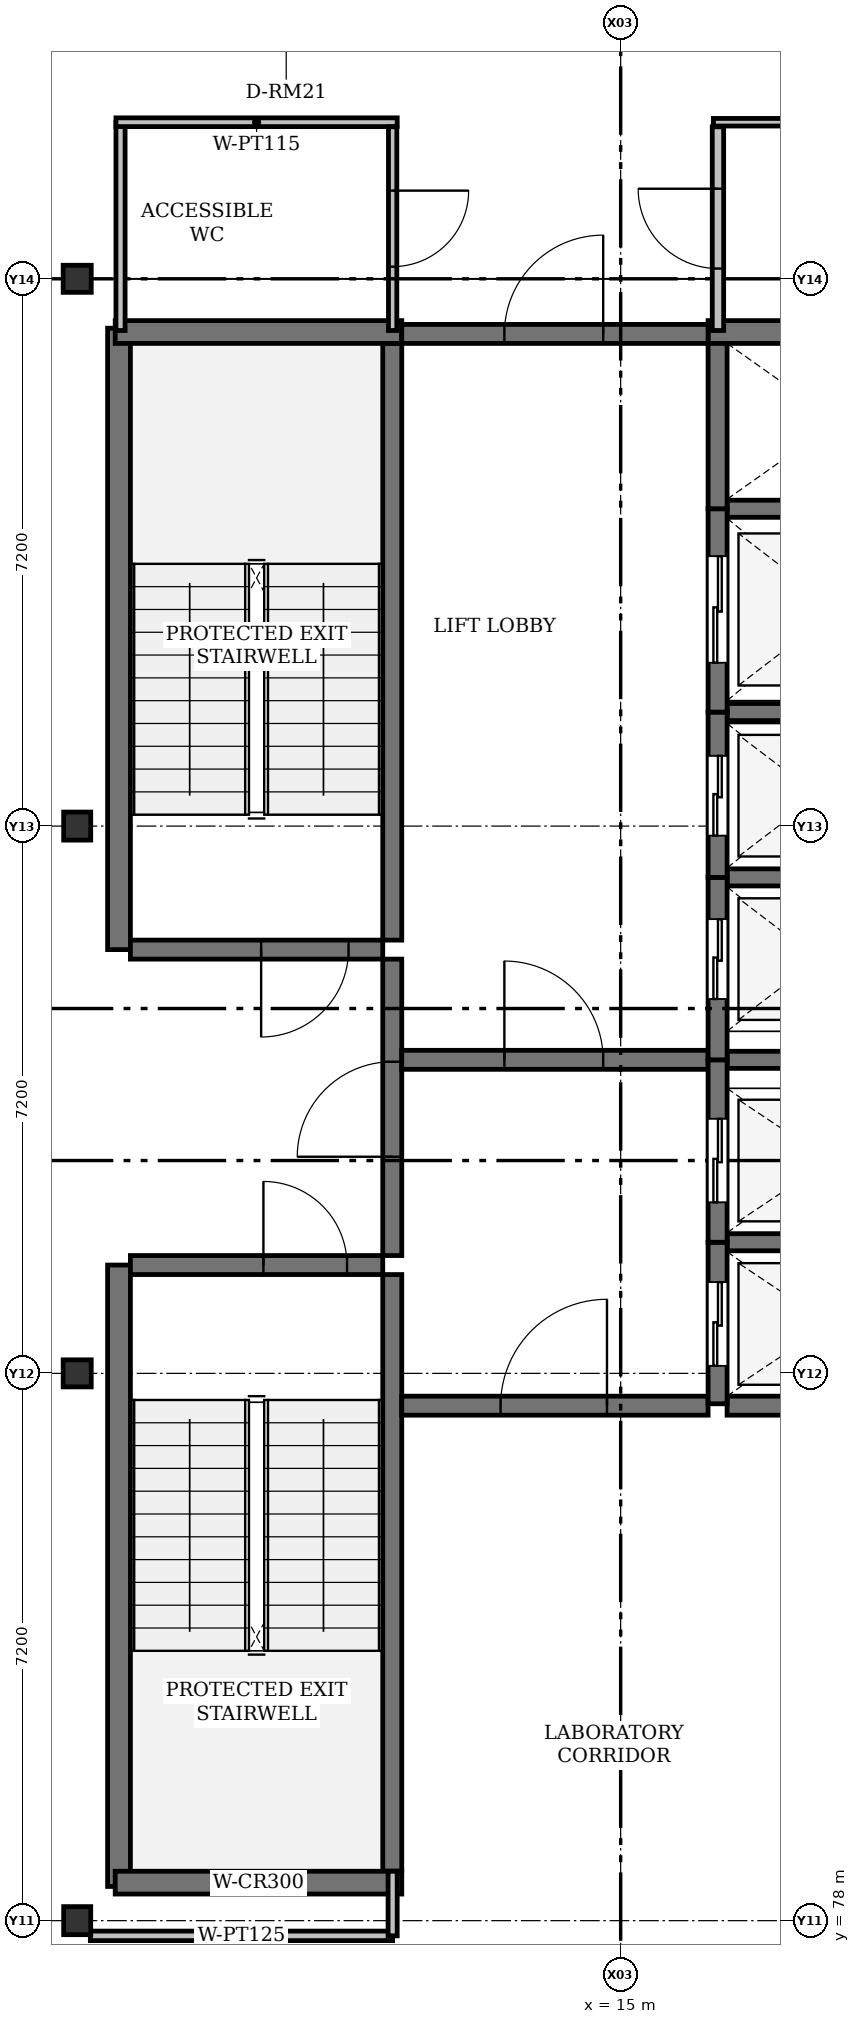
"""IFC4 building model, lengths in metres.
Left out: names, types, materials, properties, quantities, classifications, styles, units other than length and angle.
Written with IfcOpenShell. Run it as: python <this file> out.ifc"""

import sys

from ifc_helpers import new_model, si_unit, direction, frame, frame_2d, origin, origin_2d, place, context, subcontext, project, spatial, rectangle, i_section, extrude, element, fill, save


model = new_model("IFC4")
c1 = context("Model", 3, precision=1e-05, world=origin(), true_north=direction((0.0, 1.0)))
c2 = subcontext(c1, "Body", "Model", "MODEL_VIEW")
j1 = project(units=[si_unit("LENGTHUNIT", "METRE"), si_unit("PLANEANGLEUNIT", "RADIAN")], contexts=[c1])
p1 = place(None, origin())
s1 = spatial("IfcSite", under=j1, at=p1, CompositionType="ELEMENT")
p2 = place(p1, origin())
s2 = spatial("IfcBuilding", under=s1, at=p2, CompositionType="ELEMENT")
p3 = place(p2, frame((0.0, 0.0, 47.7)))
s3 = spatial("IfcBuildingStorey", under=s2, at=p3, CompositionType="ELEMENT", Elevation=47.7)
for number, where, z_axis, x_axis in (
    (1, (7.85, 78.0, 0.0), (0.0, 0.0, 1.0), (0.0, 1.0, 0.0)),
    (2, (7.85, 85.2, 0.0), (0.0, 0.0, 1.0), (1.0, 0.0, 0.0)),
    (3, (7.85, 92.4, 0.0), (0.0, 0.0, 1.0), (0.0, 1.0, 0.0)),
    (4, (7.85, 99.6, 0.0), (0.0, 0.0, 1.0), (1.0, 0.0, 0.0)),
):
    element("IfcColumn", number, at=place(p3, frame(where, z_axis=z_axis, x_axis=x_axis)), inside=s3, PredefinedType="COLUMN", context=c2, shape_type="SweptSolid", body=[
        extrude(i_section(OverallWidth=0.369, OverallDepth=0.356, WebThickness=0.011, FlangeThickness=0.018, FilletRadius=0.015, at=origin_2d()), origin(), (0.0, 0.0, 1.0), 4.2),
    ])
for number, where, z_axis, x_axis in (
    (5, (8.4, 78.45, 0.0), (0.0, 0.0, 1.0), (0.0, 1.0, 0.0)),
    (6, (8.4, 90.775, 0.0), (0.0, 0.0, 1.0), (0.0, 1.0, 0.0)),
):
    element("IfcWall", number, at=place(p3, frame(where, z_axis=z_axis, x_axis=x_axis)), inside=s3, PredefinedType="SHEAR", context=c2, shape_type="SweptSolid", body=[
        extrude(rectangle(XDim=8.175, YDim=0.3, at=frame_2d((4.087, 0.0))), origin(), (0.0, 0.0, 1.0), 4.2),
    ])
for number, where, z_axis, x_axis in (
    (7, (11.995, 78.65, 0.0), (0.0, 0.0, 1.0), (0.0, 1.0, 0.0)),
    (8, (11.995, 90.9, 0.0), (0.0, 0.0, 1.0), (0.0, 1.0, 0.0)),
):
    element("IfcWall", number, at=place(p3, frame(where, z_axis=z_axis, x_axis=x_axis)), inside=s3, PredefinedType="SHEAR", context=c2, shape_type="SweptSolid", body=[
        extrude(rectangle(XDim=7.85, YDim=0.25, at=frame_2d((3.925, 0.0))), origin(), (0.0, 0.0, 1.0), 4.2),
    ])
p4 = place(p3, frame((11.995, 86.75, 0.0), z_axis=(0.0, 0.0, 1.0), x_axis=(0.0, 1.0, 0.0)))
e9 = element("IfcWall", 9, at=p4, inside=s3, PredefinedType="SHEAR", context=c2, shape_type="SweptSolid", body=[
    extrude(rectangle(XDim=3.9, YDim=0.25, at=frame_2d((1.95, 0.0))), origin(), (0.0, 0.0, 1.0), 4.2),
])
p5 = place(p4, frame((1.3, 0.0, 0.0)))
e10 = element("IfcOpeningElement", 10, at=p5, cuts=e9, PredefinedType="OPENING", context=c2, shape_type="SweptSolid", body=[
    extrude(rectangle(XDim=1.25, YDim=2.2, at=frame_2d((0.625, 1.1))), frame((0.0, 0.125, 0.0), z_axis=(0.0, -1.0, 0.0), x_axis=(1.0, 0.0, 0.0)), (0.0, 0.0, 1.0), 0.25),
])
for number, where, z_axis, x_axis in (
    (11, (8.35, 78.5, 0.0), (0.0, 0.0, 1.0), (1.0, 0.0, 0.0)),
    (12, (8.35, 98.9, 0.0), (0.0, 0.0, 1.0), (1.0, 0.0, 0.0)),
):
    element("IfcWall", number, at=place(p3, frame(where, z_axis=z_axis, x_axis=x_axis)), inside=s3, PredefinedType="SHEAR", context=c2, shape_type="SweptSolid", body=[
        extrude(rectangle(XDim=3.77, YDim=0.3, at=frame_2d((1.885, 0.0))), origin(), (0.0, 0.0, 1.0), 4.2),
    ])
p6 = place(p3, frame((16.15, 98.9, 0.0), z_axis=(0.0, 0.0, 1.0), x_axis=(1.0, 0.0, 0.0)))
e13 = element("IfcWall", 13, at=p6, inside=s3, PredefinedType="SHEAR", context=c2, shape_type="SweptSolid", body=[
    extrude(rectangle(XDim=3.3, YDim=0.3, at=frame_2d((1.65, 0.0))), origin(), (0.0, 0.0, 1.0), 4.2),
])
p7 = place(p3, frame((12.12, 98.875, 0.0), z_axis=(0.0, 0.0, 1.0), x_axis=(1.0, 0.0, 0.0)))
e14 = element("IfcWall", 14, at=p7, inside=s3, PredefinedType="SHEAR", context=c2, shape_type="SweptSolid", body=[
    extrude(rectangle(XDim=4.03, YDim=0.25, at=frame_2d((2.015, 0.0))), origin(), (0.0, 0.0, 1.0), 4.2),
])
p8 = place(p7, frame((1.35, 0.0, 0.0)))
e15 = element("IfcOpeningElement", 15, at=p8, cuts=e14, PredefinedType="OPENING", context=c2, shape_type="SweptSolid", body=[
    extrude(rectangle(XDim=1.3, YDim=2.2, at=frame_2d((0.65, 1.1))), frame((0.0, 0.125, 0.0), z_axis=(0.0, -1.0, 0.0), x_axis=(1.0, 0.0, 0.0)), (0.0, 0.0, 1.0), 0.25),
])
p9 = place(p3, frame((8.55, 86.625, 0.0), z_axis=(0.0, 0.0, 1.0), x_axis=(1.0, 0.0, 0.0)))
e16 = element("IfcWall", 16, at=p9, inside=s3, PredefinedType="SHEAR", context=c2, shape_type="SweptSolid", body=[
    extrude(rectangle(XDim=3.32, YDim=0.25, at=frame_2d((1.66, 0.0))), origin(), (0.0, 0.0, 1.0), 4.2),
])
p10 = place(p9, frame((1.75, 0.0, 0.0)))
e17 = element("IfcOpeningElement", 17, at=p10, cuts=e16, PredefinedType="OPENING", context=c2, shape_type="SweptSolid", body=[
    extrude(rectangle(XDim=1.1, YDim=2.15, at=frame_2d((0.55, 1.075))), frame((0.0, 0.125, 0.0), z_axis=(0.0, -1.0, 0.0), x_axis=(1.0, 0.0, 0.0)), (0.0, 0.0, 1.0), 0.25),
])
p11 = place(p3, frame((11.87, 90.775, 0.0), z_axis=(0.0, 0.0, 1.0), x_axis=(-1.0, 0.0, 0.0)))
e18 = element("IfcWall", 18, at=p11, inside=s3, PredefinedType="SHEAR", context=c2, shape_type="SweptSolid", body=[
    extrude(rectangle(XDim=3.32, YDim=0.25, at=frame_2d((1.66, 0.0))), origin(), (0.0, 0.0, 1.0), 4.2),
])
p12 = place(p11, frame((0.45, 0.0, 0.0)))
e19 = element("IfcOpeningElement", 19, at=p12, cuts=e18, PredefinedType="OPENING", context=c2, shape_type="SweptSolid", body=[
    extrude(rectangle(XDim=1.15, YDim=2.15, at=frame_2d((0.575, 1.075))), frame((0.0, 0.125, 0.0), z_axis=(0.0, -1.0, 0.0), x_axis=(1.0, 0.0, 0.0)), (0.0, 0.0, 1.0), 0.25),
])
p13 = place(p3, frame((12.12, 89.325, 0.0), z_axis=(0.0, 0.0, 1.0), x_axis=(1.0, 0.0, 0.0)))
e20 = element("IfcWall", 20, at=p13, inside=s3, PredefinedType="SHEAR", context=c2, shape_type="SweptSolid", body=[
    extrude(rectangle(XDim=4.03, YDim=0.25, at=frame_2d((2.015, 0.0))), origin(), (0.0, 0.0, 1.0), 4.2),
])
p14 = place(p13, frame((1.35, 0.0, 0.0)))
e21 = element("IfcOpeningElement", 21, at=p14, cuts=e20, PredefinedType="OPENING", context=c2, shape_type="SweptSolid", body=[
    extrude(rectangle(XDim=1.3, YDim=2.2, at=frame_2d((0.65, 1.1))), frame((0.0, 0.125, 0.0), z_axis=(0.0, -1.0, 0.0), x_axis=(1.0, 0.0, 0.0)), (0.0, 0.0, 1.0), 0.25),
])
p15 = place(p3, frame((12.12, 84.775, 0.0), z_axis=(0.0, 0.0, 1.0), x_axis=(1.0, 0.0, 0.0)))
e22 = element("IfcWall", 22, at=p15, inside=s3, PredefinedType="SHEAR", context=c2, shape_type="SweptSolid", body=[
    extrude(rectangle(XDim=4.03, YDim=0.25, at=frame_2d((2.015, 0.0))), origin(), (0.0, 0.0, 1.0), 4.2),
])
p16 = place(p15, frame((1.3, 0.0, 0.0)))
e23 = element("IfcOpeningElement", 23, at=p16, cuts=e22, PredefinedType="OPENING", context=c2, shape_type="SweptSolid", body=[
    extrude(rectangle(XDim=1.4, YDim=2.25, at=frame_2d((0.7, 1.125))), frame((0.0, 0.125, 0.0), z_axis=(0.0, -1.0, 0.0), x_axis=(1.0, 0.0, 0.0)), (0.0, 0.0, 1.0), 0.25),
])
p17 = place(p3, frame((16.4, 84.775, 0.0), z_axis=(0.0, 0.0, 1.0), x_axis=(1.0, 0.0, 0.0)))
e24 = element("IfcWall", 24, at=p17, inside=s3, PredefinedType="SHEAR", context=c2, shape_type="SweptSolid", body=[
    extrude(rectangle(XDim=2.95, YDim=0.25, at=frame_2d((1.475, 0.0))), origin(), (0.0, 0.0, 1.0), 4.2),
])
for number, where, z_axis, x_axis in (
    (25, (16.4, 86.925, 0.0), (0.0, 0.0, 1.0), (1.0, 0.0, 0.0)),
    (26, (16.4, 89.325, 0.0), (0.0, 0.0, 1.0), (1.0, 0.0, 0.0)),
    (27, (16.4, 91.725, 0.0), (0.0, 0.0, 1.0), (1.0, 0.0, 0.0)),
    (28, (16.4, 93.9, 0.0), (0.0, 0.0, 1.0), (1.0, 0.0, 0.0)),
    (29, (16.4, 96.575, 0.0), (0.0, 0.0, 1.0), (1.0, 0.0, 0.0)),
):
    element("IfcWall", number, at=place(p3, frame(where, z_axis=z_axis, x_axis=x_axis)), inside=s3, PredefinedType="SHEAR", context=c2, shape_type="SweptSolid", body=[
        extrude(rectangle(XDim=2.8, YDim=0.225, at=frame_2d((1.4, 0.0))), origin(), (0.0, 0.0, 1.0), 4.2),
    ])
p18 = place(p3, frame((16.275, 84.8, 0.0), z_axis=(0.0, 0.0, 1.0), x_axis=(0.0, 1.0, 0.0)))
e30 = element("IfcWall", 30, at=p18, inside=s3, PredefinedType="SHEAR", context=c2, shape_type="SweptSolid", body=[
    extrude(rectangle(XDim=2.125, YDim=0.25, at=frame_2d((1.062, 0.0))), origin(), (0.0, 0.0, 1.0), 4.2),
])
p19 = place(p18, frame((0.5, 0.0, 0.0)))
e31 = element("IfcOpeningElement", 31, at=p19, cuts=e30, PredefinedType="OPENING", context=c2, shape_type="SweptSolid", body=[
    extrude(rectangle(XDim=1.1, YDim=2.15, at=frame_2d((0.55, 1.075))), frame((0.0, 0.125, 0.0), z_axis=(0.0, -1.0, 0.0), x_axis=(1.0, 0.0, 0.0)), (0.0, 0.0, 1.0), 0.25),
])
p20 = place(p3, frame((16.275, 86.925, 0.0), z_axis=(0.0, 0.0, 1.0), x_axis=(0.0, 1.0, 0.0)))
e32 = element("IfcWall", 32, at=p20, inside=s3, PredefinedType="SHEAR", context=c2, shape_type="SweptSolid", body=[
    extrude(rectangle(XDim=2.4, YDim=0.25, at=frame_2d((1.2, 0.0))), origin(), (0.0, 0.0, 1.0), 4.2),
])
p21 = place(p20, frame((0.525, 0.0, 0.0)))
e33 = element("IfcOpeningElement", 33, at=p21, cuts=e32, PredefinedType="OPENING", context=c2, shape_type="SweptSolid", body=[
    extrude(rectangle(XDim=1.1, YDim=2.15, at=frame_2d((0.55, 1.075))), frame((0.0, 0.125, 0.0), z_axis=(0.0, -1.0, 0.0), x_axis=(1.0, 0.0, 0.0)), (0.0, 0.0, 1.0), 0.25),
])
p22 = place(p3, frame((16.275, 89.325, 0.0), z_axis=(0.0, 0.0, 1.0), x_axis=(0.0, 1.0, 0.0)))
e34 = element("IfcWall", 34, at=p22, inside=s3, PredefinedType="SHEAR", context=c2, shape_type="SweptSolid", body=[
    extrude(rectangle(XDim=2.4, YDim=0.25, at=frame_2d((1.2, 0.0))), origin(), (0.0, 0.0, 1.0), 4.2),
])
p23 = place(p22, frame((0.8, 0.0, 0.0)))
e35 = element("IfcOpeningElement", 35, at=p23, cuts=e34, PredefinedType="OPENING", context=c2, shape_type="SweptSolid", body=[
    extrude(rectangle(XDim=1.05, YDim=2.15, at=frame_2d((0.525, 1.075))), frame((0.0, 0.125, 0.0), z_axis=(0.0, -1.0, 0.0), x_axis=(1.0, 0.0, 0.0)), (0.0, 0.0, 1.0), 0.25),
])
p24 = place(p3, frame((16.275, 91.725, 0.0), z_axis=(0.0, 0.0, 1.0), x_axis=(0.0, 1.0, 0.0)))
e36 = element("IfcWall", 36, at=p24, inside=s3, PredefinedType="SHEAR", context=c2, shape_type="SweptSolid", body=[
    extrude(rectangle(XDim=2.175, YDim=0.25, at=frame_2d((1.087, 0.0))), origin(), (0.0, 0.0, 1.0), 4.2),
])
p25 = place(p24, frame((0.55, 0.0, 0.0)))
e37 = element("IfcOpeningElement", 37, at=p25, cuts=e36, PredefinedType="OPENING", context=c2, shape_type="SweptSolid", body=[
    extrude(rectangle(XDim=1.05, YDim=2.15, at=frame_2d((0.525, 1.075))), frame((0.0, 0.125, 0.0), z_axis=(0.0, -1.0, 0.0), x_axis=(1.0, 0.0, 0.0)), (0.0, 0.0, 1.0), 0.25),
])
p26 = place(p3, frame((16.275, 93.9, 0.0), z_axis=(0.0, 0.0, 1.0), x_axis=(0.0, 1.0, 0.0)))
e38 = element("IfcWall", 38, at=p26, inside=s3, PredefinedType="SHEAR", context=c2, shape_type="SweptSolid", body=[
    extrude(rectangle(XDim=2.675, YDim=0.25, at=frame_2d((1.337, 0.0))), origin(), (0.0, 0.0, 1.0), 4.2),
])
p27 = place(p26, frame((0.65, 0.0, 0.0)))
e39 = element("IfcOpeningElement", 39, at=p27, cuts=e38, PredefinedType="OPENING", context=c2, shape_type="SweptSolid", body=[
    extrude(rectangle(XDim=1.4, YDim=2.25, at=frame_2d((0.7, 1.125))), frame((0.0, 0.125, 0.0), z_axis=(0.0, -1.0, 0.0), x_axis=(1.0, 0.0, 0.0)), (0.0, 0.0, 1.0), 0.25),
])
p28 = place(p3, frame((16.275, 96.575, 0.0), z_axis=(0.0, 0.0, 1.0), x_axis=(0.0, 1.0, 0.0)))
e40 = element("IfcWall", 40, at=p28, inside=s3, PredefinedType="SHEAR", context=c2, shape_type="SweptSolid", body=[
    extrude(rectangle(XDim=2.175, YDim=0.25, at=frame_2d((1.087, 0.0))), origin(), (0.0, 0.0, 1.0), 4.2),
])
p29 = place(p3, frame((8.42, 98.92, 0.0), z_axis=(0.0, 0.0, 1.0), x_axis=(0.0, 1.0, 0.0)))
e41 = element("IfcWall", 41, at=p29, inside=s3, PredefinedType="PARTITIONING", context=c2, shape_type="SweptSolid", body=[
    extrude(rectangle(XDim=2.74, YDim=0.12, at=frame_2d((1.37, 0.0))), origin(), (0.0, 0.0, 1.0), 3.451),
])
p30 = place(p3, frame((8.36, 101.66, 0.0), z_axis=(0.0, 0.0, 1.0), x_axis=(1.0, 0.0, 0.0)))
e42 = element("IfcWall", 42, at=p30, inside=s3, PredefinedType="PARTITIONING", context=c2, shape_type="SweptSolid", body=[
    extrude(rectangle(XDim=3.7, YDim=0.115, at=frame_2d((1.85, 0.0))), origin(), (0.0, 0.0, 1.0), 3.95),
])
p31 = place(p3, frame((12.0, 101.6, 0.0), z_axis=(0.0, 0.0, 1.0), x_axis=(0.0, -1.0, 0.0)))
e43 = element("IfcWall", 43, at=p31, inside=s3, PredefinedType="PARTITIONING", context=c2, shape_type="SweptSolid", body=[
    extrude(rectangle(XDim=2.68, YDim=0.11, at=frame_2d((1.34, 0.0))), origin(), (0.0, 0.0, 1.0), 3.451),
])
p32 = place(p31, frame((0.84, 0.0, 0.0)))
e44 = element("IfcOpeningElement", 44, at=p32, cuts=e43, PredefinedType="OPENING", context=c2, shape_type="SweptSolid", body=[
    extrude(rectangle(XDim=1.0, YDim=2.2, at=frame_2d((0.5, 1.1))), frame((0.0, 0.055, 0.0), z_axis=(0.0, -1.0, 0.0), x_axis=(1.0, 0.0, 0.0)), (0.0, 0.0, 1.0), 0.11),
])
p33 = place(p3, frame((19.38, 101.66, 0.0), z_axis=(0.0, 0.0, 1.0), x_axis=(-1.0, 0.0, 0.0)))
e45 = element("IfcWall", 45, at=p33, inside=s3, PredefinedType="PARTITIONING", context=c2, shape_type="SweptSolid", body=[
    extrude(rectangle(XDim=3.16, YDim=0.1, at=frame_2d((1.58, 0.0))), origin(), (0.0, 0.0, 1.0), 3.95),
])
p34 = place(p3, frame((16.28, 98.92, 0.0), z_axis=(0.0, 0.0, 1.0), x_axis=(0.0, 1.0, 0.0)))
e46 = element("IfcWall", 46, at=p34, inside=s3, PredefinedType="PARTITIONING", context=c2, shape_type="SweptSolid", body=[
    extrude(rectangle(XDim=2.68, YDim=0.15, at=frame_2d((1.34, 0.0))), origin(), (0.0, 0.0, 1.0), 3.451),
])
p35 = place(p34, frame((0.815, 0.0, 0.0)))
e47 = element("IfcOpeningElement", 47, at=p35, cuts=e46, PredefinedType="OPENING", context=c2, shape_type="SweptSolid", body=[
    extrude(rectangle(XDim=1.05, YDim=2.2, at=frame_2d((0.525, 1.1))), frame((0.0, 0.075, 0.0), z_axis=(0.0, -1.0, 0.0), x_axis=(1.0, 0.0, 0.0)), (0.0, 0.0, 1.0), 0.15),
])
p36 = place(p3, frame((8.023, 77.8, 0.0), z_axis=(0.0, 0.0, 1.0), x_axis=(1.0, 0.0, 0.0)))
e48 = element("IfcWall", 48, at=p36, inside=s3, PredefinedType="PARTITIONING", context=c2, shape_type="SweptSolid", body=[
    extrude(rectangle(XDim=3.977, YDim=0.125, at=frame_2d((1.989, 0.0))), origin(), (0.0, 0.0, 1.0), 3.451),
])
p37 = place(p3, frame((12.0, 77.8, 0.0), z_axis=(0.0, 0.0, 1.0), x_axis=(0.0, 1.0, 0.0)))
e49 = element("IfcWall", 49, at=p37, inside=s3, PredefinedType="PARTITIONING", context=c2, shape_type="SweptSolid", body=[
    extrude(rectangle(XDim=0.85, YDim=0.12, at=frame_2d((0.425, 0.0))), origin(), (0.0, 0.0, 1.0), 3.451),
])
p38 = place(p5, origin())
e50 = element("IfcDoor", 50, at=p38, inside=s3, OperationType="SINGLE_SWING_LEFT", PredefinedType="DOOR", context=c2, shape_type="SweptSolid", body=[
    extrude(rectangle(XDim=1.25, YDim=2.2, at=frame_2d((0.625, 1.1))), frame((0.0, 0.025, 0.0), z_axis=(0.0, -1.0, 0.0), x_axis=(1.0, 0.0, 0.0)), (0.0, 0.0, 1.0), 0.05),
])
fill(e10, e50)
p39 = place(p8, origin())
e51 = element("IfcDoor", 51, at=p39, inside=s3, OperationType="SINGLE_SWING_RIGHT", PredefinedType="DOOR", context=c2, shape_type="SweptSolid", body=[
    extrude(rectangle(XDim=1.3, YDim=2.2, at=frame_2d((0.65, 1.1))), frame((0.0, 0.025, 0.0), z_axis=(0.0, -1.0, 0.0), x_axis=(1.0, 0.0, 0.0)), (0.0, 0.0, 1.0), 0.05),
])
fill(e15, e51)
p40 = place(p10, origin())
e52 = element("IfcDoor", 52, at=p40, inside=s3, OperationType="SINGLE_SWING_LEFT", PredefinedType="DOOR", context=c2, shape_type="SweptSolid", body=[
    extrude(rectangle(XDim=1.1, YDim=2.15, at=frame_2d((0.55, 1.075))), frame((0.0, 0.025, 0.0), z_axis=(0.0, -1.0, 0.0), x_axis=(1.0, 0.0, 0.0)), (0.0, 0.0, 1.0), 0.05),
])
fill(e17, e52)
p41 = place(p12, origin())
e53 = element("IfcDoor", 53, at=p41, inside=s3, OperationType="SINGLE_SWING_RIGHT", PredefinedType="DOOR", context=c2, shape_type="SweptSolid", body=[
    extrude(rectangle(XDim=1.15, YDim=2.15, at=frame_2d((0.575, 1.075))), frame((0.0, 0.025, 0.0), z_axis=(0.0, -1.0, 0.0), x_axis=(1.0, 0.0, 0.0)), (0.0, 0.0, 1.0), 0.05),
])
fill(e19, e53)
p42 = place(p14, origin())
e54 = element("IfcDoor", 54, at=p42, inside=s3, OperationType="SINGLE_SWING_LEFT", PredefinedType="DOOR", context=c2, shape_type="SweptSolid", body=[
    extrude(rectangle(XDim=1.3, YDim=2.2, at=frame_2d((0.65, 1.1))), frame((0.0, 0.025, 0.0), z_axis=(0.0, -1.0, 0.0), x_axis=(1.0, 0.0, 0.0)), (0.0, 0.0, 1.0), 0.05),
])
fill(e21, e54)
p43 = place(p16, origin())
e55 = element("IfcDoor", 55, at=p43, inside=s3, OperationType="SINGLE_SWING_RIGHT", PredefinedType="DOOR", context=c2, shape_type="SweptSolid", body=[
    extrude(rectangle(XDim=1.4, YDim=2.25, at=frame_2d((0.7, 1.125))), frame((0.0, 0.025, 0.0), z_axis=(0.0, -1.0, 0.0), x_axis=(1.0, 0.0, 0.0)), (0.0, 0.0, 1.0), 0.05),
])
fill(e23, e55)
p44 = place(p19, origin())
e56 = element("IfcDoor", 56, at=p44, inside=s3, OperationType="SLIDING_TO_LEFT", PredefinedType="DOOR", context=c2, shape_type="SweptSolid", body=[
    extrude(rectangle(XDim=1.1, YDim=2.15, at=frame_2d((0.55, 1.075))), frame((0.0, 0.025, 0.0), z_axis=(0.0, -1.0, 0.0), x_axis=(1.0, 0.0, 0.0)), (0.0, 0.0, 1.0), 0.05),
])
fill(e31, e56)
p45 = place(p21, origin())
e57 = element("IfcDoor", 57, at=p45, inside=s3, OperationType="SLIDING_TO_LEFT", PredefinedType="DOOR", context=c2, shape_type="SweptSolid", body=[
    extrude(rectangle(XDim=1.1, YDim=2.15, at=frame_2d((0.55, 1.075))), frame((0.0, 0.025, 0.0), z_axis=(0.0, -1.0, 0.0), x_axis=(1.0, 0.0, 0.0)), (0.0, 0.0, 1.0), 0.05),
])
fill(e33, e57)
p46 = place(p23, origin())
e58 = element("IfcDoor", 58, at=p46, inside=s3, OperationType="SLIDING_TO_LEFT", PredefinedType="DOOR", context=c2, shape_type="SweptSolid", body=[
    extrude(rectangle(XDim=1.05, YDim=2.15, at=frame_2d((0.525, 1.075))), frame((0.0, 0.025, 0.0), z_axis=(0.0, -1.0, 0.0), x_axis=(1.0, 0.0, 0.0)), (0.0, 0.0, 1.0), 0.05),
])
fill(e35, e58)
p47 = place(p25, origin())
e59 = element("IfcDoor", 59, at=p47, inside=s3, OperationType="SLIDING_TO_LEFT", PredefinedType="DOOR", context=c2, shape_type="SweptSolid", body=[
    extrude(rectangle(XDim=1.05, YDim=2.15, at=frame_2d((0.525, 1.075))), frame((0.0, 0.025, 0.0), z_axis=(0.0, -1.0, 0.0), x_axis=(1.0, 0.0, 0.0)), (0.0, 0.0, 1.0), 0.05),
])
fill(e37, e59)
p48 = place(p27, origin())
e60 = element("IfcDoor", 60, at=p48, inside=s3, OperationType="SLIDING_TO_LEFT", PredefinedType="DOOR", context=c2, shape_type="SweptSolid", body=[
    extrude(rectangle(XDim=1.4, YDim=2.25, at=frame_2d((0.7, 1.125))), frame((0.0, 0.025, 0.0), z_axis=(0.0, -1.0, 0.0), x_axis=(1.0, 0.0, 0.0)), (0.0, 0.0, 1.0), 0.05),
])
fill(e39, e60)
p49 = place(p32, origin())
e61 = element("IfcDoor", 61, at=p49, inside=s3, OperationType="SINGLE_SWING_LEFT", PredefinedType="DOOR", context=c2, shape_type="SweptSolid", body=[
    extrude(rectangle(XDim=1.0, YDim=2.2, at=frame_2d((0.5, 1.1))), frame((0.0, 0.025, 0.0), z_axis=(0.0, -1.0, 0.0), x_axis=(1.0, 0.0, 0.0)), (0.0, 0.0, 1.0), 0.05),
])
fill(e44, e61)
p50 = place(p35, origin())
e62 = element("IfcDoor", 62, at=p50, inside=s3, OperationType="SINGLE_SWING_RIGHT", PredefinedType="DOOR", context=c2, shape_type="SweptSolid", body=[
    extrude(rectangle(XDim=1.05, YDim=2.2, at=frame_2d((0.525, 1.1))), frame((0.0, 0.025, 0.0), z_axis=(0.0, -1.0, 0.0), x_axis=(1.0, 0.0, 0.0)), (0.0, 0.0, 1.0), 0.05),
])
fill(e47, e62)
save(model, sys.argv[1])
